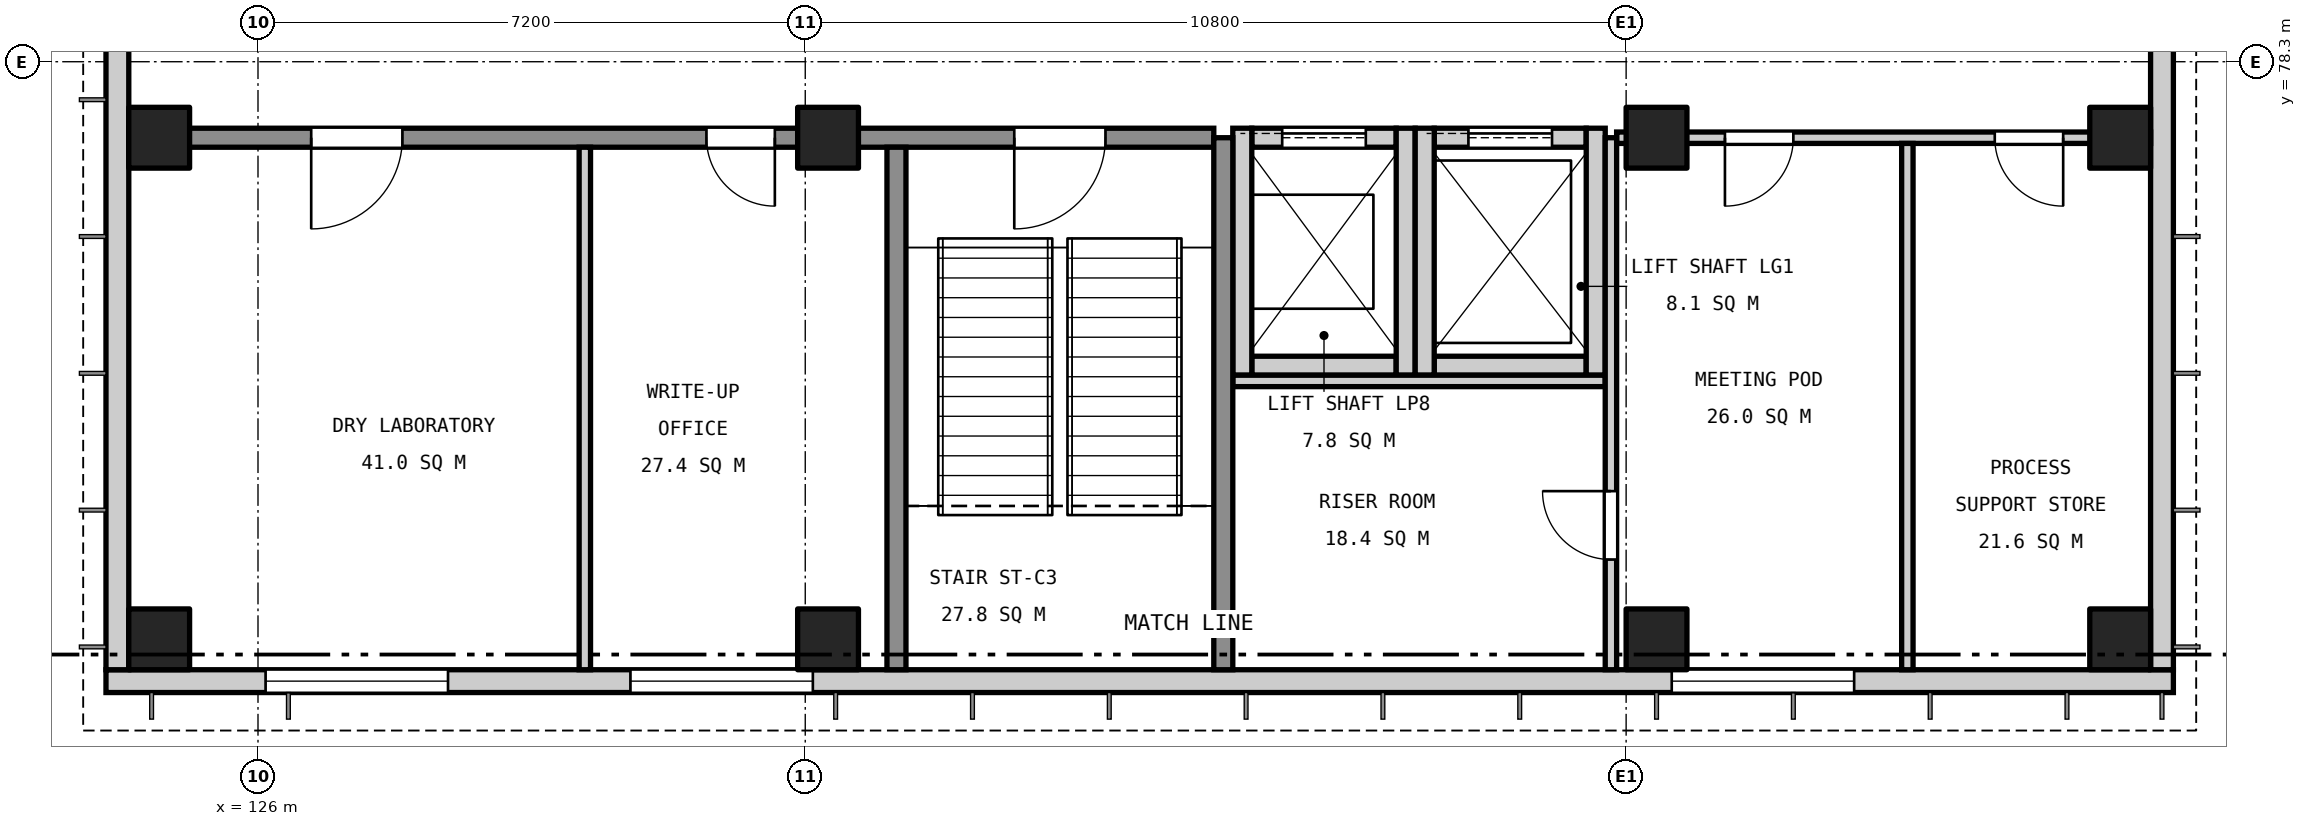
"""IFC4 building model, lengths in metres.
Left out: names, types, materials, properties, quantities, classifications, styles, units other than length and angle.
Written with IfcOpenShell. Run it as: python <this file> out.ifc"""

import sys

from ifc_helpers import new_model, si_unit, direction, frame, frame_2d, origin, origin_2d, place, context, subcontext, project, spatial, rectangle, extrude, element, fill, save


model = new_model("IFC4")
c1 = context("Model", 3, precision=1e-05, world=origin(), true_north=direction((0.0, 1.0)))
c2 = subcontext(c1, "Body", "Model", "MODEL_VIEW")
j1 = project(units=[si_unit("LENGTHUNIT", "METRE"), si_unit("PLANEANGLEUNIT", "RADIAN")], contexts=[c1])
p1 = place(None, origin())
s1 = spatial("IfcSite", under=j1, at=p1, CompositionType="ELEMENT")
p2 = place(p1, origin())
s2 = spatial("IfcBuilding", under=s1, at=p2, CompositionType="ELEMENT")
p3 = place(p2, frame((0.0, 0.0, 11.4)))
s3 = spatial("IfcBuildingStorey", under=s2, at=p3, CompositionType="ELEMENT", Elevation=11.4)
p4 = place(p3, frame((139.075, 74.3, 0.0), z_axis=(0.0, 0.0, 1.0), x_axis=(1.0, 0.0, 0.0)))
e1 = element("IfcWall", 1, at=p4, inside=s3, PredefinedType="SOLIDWALL", context=c2, shape_type="SweptSolid", body=[
    extrude(rectangle(XDim=1.9, YDim=0.25, at=frame_2d((0.95, 0.0))), origin(), (0.0, 0.0, 1.0), 4.95),
])
p5 = place(p3, frame((139.075, 77.3, 0.0), z_axis=(0.0, 0.0, 1.0), x_axis=(1.0, 0.0, 0.0)))
e2 = element("IfcWall", 2, at=p5, inside=s3, PredefinedType="SOLIDWALL", context=c2, shape_type="SweptSolid", body=[
    extrude(rectangle(XDim=1.9, YDim=0.25, at=frame_2d((0.95, 0.0))), origin(), (0.0, 0.0, 1.0), 4.95),
])
p6 = place(p5, frame((0.4, 0.0, 0.0)))
e3 = element("IfcOpeningElement", 3, at=p6, cuts=e2, PredefinedType="OPENING", context=c2, shape_type="SweptSolid", body=[
    extrude(rectangle(XDim=1.1, YDim=2.1, at=frame_2d((0.55, 1.05))), frame((0.0, 0.135, 0.0), z_axis=(0.0, -1.0, 0.0), x_axis=(1.0, 0.0, 0.0)), (0.0, 0.0, 1.0), 0.27),
])
for number, where, z_axis, x_axis in (
    (4, (138.95, 74.175, 0.0), (0.0, 0.0, 1.0), (0.0, 1.0, 0.0)),
    (5, (141.1, 74.175, 0.0), (0.0, 0.0, 1.0), (0.0, 1.0, 0.0)),
):
    element("IfcWall", number, at=place(p3, frame(where, z_axis=z_axis, x_axis=x_axis)), inside=s3, PredefinedType="SOLIDWALL", context=c2, shape_type="SweptSolid", body=[
        extrude(rectangle(XDim=3.25, YDim=0.25, at=frame_2d((1.625, 0.0))), origin(), (0.0, 0.0, 1.0), 4.95),
    ])
p7 = place(p3, frame((141.475, 74.3, 0.0), z_axis=(0.0, 0.0, 1.0), x_axis=(1.0, 0.0, 0.0)))
e6 = element("IfcWall", 6, at=p7, inside=s3, PredefinedType="SOLIDWALL", context=c2, shape_type="SweptSolid", body=[
    extrude(rectangle(XDim=2.0, YDim=0.25, at=frame_2d((1.0, 0.0))), origin(), (0.0, 0.0, 1.0), 4.95),
])
p8 = place(p3, frame((141.475, 77.3, 0.0), z_axis=(0.0, 0.0, 1.0), x_axis=(1.0, 0.0, 0.0)))
e7 = element("IfcWall", 7, at=p8, inside=s3, PredefinedType="SOLIDWALL", context=c2, shape_type="SweptSolid", body=[
    extrude(rectangle(XDim=2.0, YDim=0.25, at=frame_2d((1.0, 0.0))), origin(), (0.0, 0.0, 1.0), 4.95),
])
p9 = place(p8, frame((0.45, 0.0, 0.0)))
e8 = element("IfcOpeningElement", 8, at=p9, cuts=e7, PredefinedType="OPENING", context=c2, shape_type="SweptSolid", body=[
    extrude(rectangle(XDim=1.1, YDim=2.1, at=frame_2d((0.55, 1.05))), frame((0.0, 0.135, 0.0), z_axis=(0.0, -1.0, 0.0), x_axis=(1.0, 0.0, 0.0)), (0.0, 0.0, 1.0), 0.27),
])
for number, where, z_axis, x_axis in (
    (9, (141.35, 74.175, 0.0), (0.0, 0.0, 1.0), (0.0, 1.0, 0.0)),
    (10, (143.6, 74.175, 0.0), (0.0, 0.0, 1.0), (0.0, 1.0, 0.0)),
):
    element("IfcWall", number, at=place(p3, frame(where, z_axis=z_axis, x_axis=x_axis)), inside=s3, PredefinedType="SOLIDWALL", context=c2, shape_type="SweptSolid", body=[
        extrude(rectangle(XDim=3.25, YDim=0.25, at=frame_2d((1.625, 0.0))), origin(), (0.0, 0.0, 1.0), 4.95),
    ])
for number, where, z_axis, x_axis in (
    (11, (124.7, 70.7, 0.0), (0.0, 0.0, 1.0), (1.0, 0.0, 0.0)),
    (12, (124.7, 77.3, 0.0), (0.0, 0.0, 1.0), (1.0, 0.0, 0.0)),
    (13, (133.5, 70.7, 0.0), (0.0, 0.0, 1.0), (1.0, 0.0, 0.0)),
    (14, (133.5, 77.3, 0.0), (0.0, 0.0, 1.0), (1.0, 0.0, 0.0)),
    (15, (144.4, 70.7, 0.0), (0.0, 0.0, 1.0), (1.0, 0.0, 0.0)),
    (16, (144.4, 77.3, 0.0), (0.0, 0.0, 1.0), (1.0, 0.0, 0.0)),
    (17, (150.5, 70.7, 0.0), (0.0, 0.0, 1.0), (1.0, 0.0, 0.0)),
    (18, (150.5, 77.3, 0.0), (0.0, 0.0, 1.0), (1.0, 0.0, 0.0)),
):
    element("IfcColumn", number, at=place(p3, frame(where, z_axis=z_axis, x_axis=x_axis)), inside=s3, PredefinedType="COLUMN", context=c2, shape_type="SweptSolid", body=[
        extrude(rectangle(XDim=0.8, YDim=0.8, at=origin_2d()), origin(), (0.0, 0.0, 1.0), 5.4),
    ])
p10 = place(p3, frame((124.0, 70.15, 0.0), z_axis=(0.0, 0.0, 1.0), x_axis=(1.0, 0.0, 0.0)))
e19 = element("IfcWall", 19, at=p10, inside=s3, PredefinedType="SOLIDWALL", context=c2, shape_type="SweptSolid", body=[
    extrude(rectangle(XDim=27.2, YDim=0.3, at=frame_2d((13.6, 0.0))), origin(), (0.0, 0.0, 1.0), 4.95),
])
p11 = place(p10, frame((2.1, 0.0, 0.9)))
e20 = element("IfcOpeningElement", 20, at=p11, cuts=e19, PredefinedType="OPENING", context=c2, shape_type="SweptSolid", body=[
    extrude(rectangle(XDim=2.4, YDim=1.8, at=frame_2d((1.2, 0.9))), frame((0.0, 0.16, 0.0), z_axis=(0.0, -1.0, 0.0), x_axis=(1.0, 0.0, 0.0)), (0.0, 0.0, 1.0), 0.32),
])
p12 = place(p10, frame((6.9, 0.0, 0.9)))
e21 = element("IfcOpeningElement", 21, at=p12, cuts=e19, PredefinedType="OPENING", context=c2, shape_type="SweptSolid", body=[
    extrude(rectangle(XDim=2.4, YDim=1.8, at=frame_2d((1.2, 0.9))), frame((0.0, 0.16, 0.0), z_axis=(0.0, -1.0, 0.0), x_axis=(1.0, 0.0, 0.0)), (0.0, 0.0, 1.0), 0.32),
])
p13 = place(p10, frame((20.6, 0.0, 0.9)))
e22 = element("IfcOpeningElement", 22, at=p13, cuts=e19, PredefinedType="OPENING", context=c2, shape_type="SweptSolid", body=[
    extrude(rectangle(XDim=2.4, YDim=1.8, at=frame_2d((1.2, 0.9))), frame((0.0, 0.16, 0.0), z_axis=(0.0, -1.0, 0.0), x_axis=(1.0, 0.0, 0.0)), (0.0, 0.0, 1.0), 0.32),
])
for number, where, z_axis, x_axis in (
    (23, (124.15, 70.3, 0.0), (0.0, 0.0, 1.0), (0.0, 1.0, 0.0)),
    (24, (151.05, 70.3, 0.0), (0.0, 0.0, 1.0), (0.0, 1.0, 0.0)),
):
    element("IfcWall", number, at=place(p3, frame(where, z_axis=z_axis, x_axis=x_axis)), inside=s3, PredefinedType="SOLIDWALL", context=c2, shape_type="SweptSolid", body=[
        extrude(rectangle(XDim=36.5, YDim=0.3, at=frame_2d((18.25, 0.0))), origin(), (0.0, 0.0, 1.0), 4.95),
    ])
p14 = place(p3, frame((138.825, 74.1, 0.0), z_axis=(0.0, 0.0, 1.0), x_axis=(1.0, 0.0, 0.0)))
e25 = element("IfcWall", 25, at=p14, inside=s3, PredefinedType="SOLIDWALL", context=c2, shape_type="SweptSolid", body=[
    extrude(rectangle(XDim=4.9, YDim=0.15, at=frame_2d((2.45, 0.0))), origin(), (0.0, 0.0, 1.0), 4.95),
])
p15 = place(p3, frame((124.3, 77.3, 0.0), z_axis=(0.0, 0.0, 1.0), x_axis=(1.0, 0.0, 0.0)))
e26 = element("IfcWall", 26, at=p15, inside=s3, PredefinedType="SOLIDWALL", context=c2, shape_type="SweptSolid", body=[
    extrude(rectangle(XDim=14.275, YDim=0.25, at=frame_2d((7.137, 0.0))), origin(), (0.0, 0.0, 1.0), 4.95),
])
p16 = place(p15, frame((2.4, 0.0, 0.0)))
e27 = element("IfcOpeningElement", 27, at=p16, cuts=e26, PredefinedType="OPENING", context=c2, shape_type="SweptSolid", body=[
    extrude(rectangle(XDim=1.2, YDim=2.1, at=frame_2d((0.6, 1.05))), frame((0.0, 0.135, 0.0), z_axis=(0.0, -1.0, 0.0), x_axis=(1.0, 0.0, 0.0)), (0.0, 0.0, 1.0), 0.27),
])
p17 = place(p15, frame((7.6, 0.0, 0.0)))
e28 = element("IfcOpeningElement", 28, at=p17, cuts=e26, PredefinedType="OPENING", context=c2, shape_type="SweptSolid", body=[
    extrude(rectangle(XDim=0.9, YDim=2.1, at=frame_2d((0.45, 1.05))), frame((0.0, 0.135, 0.0), z_axis=(0.0, -1.0, 0.0), x_axis=(1.0, 0.0, 0.0)), (0.0, 0.0, 1.0), 0.27),
])
p18 = place(p15, frame((11.65, 0.0, 0.0)))
e29 = element("IfcOpeningElement", 29, at=p18, cuts=e26, PredefinedType="OPENING", context=c2, shape_type="SweptSolid", body=[
    extrude(rectangle(XDim=1.2, YDim=2.1, at=frame_2d((0.6, 1.05))), frame((0.0, 0.135, 0.0), z_axis=(0.0, -1.0, 0.0), x_axis=(1.0, 0.0, 0.0)), (0.0, 0.0, 1.0), 0.27),
])
p19 = place(p3, frame((143.875, 77.3, 0.0), z_axis=(0.0, 0.0, 1.0), x_axis=(1.0, 0.0, 0.0)))
e30 = element("IfcWall", 30, at=p19, inside=s3, PredefinedType="SOLIDWALL", context=c2, shape_type="SweptSolid", body=[
    extrude(rectangle(XDim=7.025, YDim=0.15, at=frame_2d((3.512, 0.0))), origin(), (0.0, 0.0, 1.0), 4.95),
])
p20 = place(p19, frame((1.425, 0.0, 0.0)))
e31 = element("IfcOpeningElement", 31, at=p20, cuts=e30, PredefinedType="OPENING", context=c2, shape_type="SweptSolid", body=[
    extrude(rectangle(XDim=0.9, YDim=2.1, at=frame_2d((0.45, 1.05))), frame((0.0, 0.085, 0.0), z_axis=(0.0, -1.0, 0.0), x_axis=(1.0, 0.0, 0.0)), (0.0, 0.0, 1.0), 0.17),
])
p21 = place(p19, frame((4.975, 0.0, 0.0)))
e32 = element("IfcOpeningElement", 32, at=p21, cuts=e30, PredefinedType="OPENING", context=c2, shape_type="SweptSolid", body=[
    extrude(rectangle(XDim=0.9, YDim=2.1, at=frame_2d((0.45, 1.05))), frame((0.0, 0.085, 0.0), z_axis=(0.0, -1.0, 0.0), x_axis=(1.0, 0.0, 0.0)), (0.0, 0.0, 1.0), 0.17),
])
p22 = place(p3, frame((130.3, 70.3, 0.0), z_axis=(0.0, 0.0, 1.0), x_axis=(0.0, 1.0, 0.0)))
e33 = element("IfcWall", 33, at=p22, inside=s3, PredefinedType="SOLIDWALL", context=c2, shape_type="SweptSolid", body=[
    extrude(rectangle(XDim=6.875, YDim=0.15, at=frame_2d((3.438, 0.0))), origin(), (0.0, 0.0, 1.0), 4.95),
])
p23 = place(p3, frame((134.4, 70.3, 0.0), z_axis=(0.0, 0.0, 1.0), x_axis=(0.0, 1.0, 0.0)))
e34 = element("IfcWall", 34, at=p23, inside=s3, PredefinedType="SOLIDWALL", context=c2, shape_type="SweptSolid", body=[
    extrude(rectangle(XDim=6.875, YDim=0.25, at=frame_2d((3.438, 0.0))), origin(), (0.0, 0.0, 1.0), 4.95),
])
p24 = place(p3, frame((138.7, 70.3, 0.0), z_axis=(0.0, 0.0, 1.0), x_axis=(0.0, 1.0, 0.0)))
e35 = element("IfcWall", 35, at=p24, inside=s3, PredefinedType="SOLIDWALL", context=c2, shape_type="SweptSolid", body=[
    extrude(rectangle(XDim=7.0, YDim=0.25, at=frame_2d((3.5, 0.0))), origin(), (0.0, 0.0, 1.0), 4.95),
])
p25 = place(p3, frame((143.8, 70.3, 0.0), z_axis=(0.0, 0.0, 1.0), x_axis=(0.0, 1.0, 0.0)))
e36 = element("IfcWall", 36, at=p25, inside=s3, PredefinedType="SOLIDWALL", context=c2, shape_type="SweptSolid", body=[
    extrude(rectangle(XDim=7.0, YDim=0.15, at=frame_2d((3.5, 0.0))), origin(), (0.0, 0.0, 1.0), 4.95),
])
p26 = place(p25, frame((1.45, 0.0, 0.0)))
e37 = element("IfcOpeningElement", 37, at=p26, cuts=e36, PredefinedType="OPENING", context=c2, shape_type="SweptSolid", body=[
    extrude(rectangle(XDim=0.9, YDim=2.1, at=frame_2d((0.45, 1.05))), frame((0.0, 0.085, 0.0), z_axis=(0.0, -1.0, 0.0), x_axis=(1.0, 0.0, 0.0)), (0.0, 0.0, 1.0), 0.17),
])
p27 = place(p3, frame((147.7, 70.3, 0.0), z_axis=(0.0, 0.0, 1.0), x_axis=(0.0, 1.0, 0.0)))
e38 = element("IfcWall", 38, at=p27, inside=s3, PredefinedType="SOLIDWALL", context=c2, shape_type="SweptSolid", body=[
    extrude(rectangle(XDim=6.925, YDim=0.15, at=frame_2d((3.462, 0.0))), origin(), (0.0, 0.0, 1.0), 4.95),
])
p28 = place(p16, frame((1.2, 0.0, 0.0), z_axis=(0.0, 0.0, 1.0), x_axis=(-1.0, 0.0, 0.0)))
e39 = element("IfcDoor", 39, at=p28, inside=s3, OperationType="SINGLE_SWING_RIGHT", PredefinedType="DOOR", context=c2, shape_type="SweptSolid", body=[
    extrude(rectangle(XDim=1.2, YDim=2.1, at=frame_2d((0.6, 1.05))), frame((0.0, 0.025, 0.0), z_axis=(0.0, -1.0, 0.0), x_axis=(1.0, 0.0, 0.0)), (0.0, 0.0, 1.0), 0.05),
])
fill(e27, e39)
p29 = place(p17, frame((0.9, 0.0, 0.0), z_axis=(0.0, 0.0, 1.0), x_axis=(-1.0, 0.0, 0.0)))
e40 = element("IfcDoor", 40, at=p29, inside=s3, OperationType="SINGLE_SWING_LEFT", PredefinedType="DOOR", context=c2, shape_type="SweptSolid", body=[
    extrude(rectangle(XDim=0.9, YDim=2.1, at=frame_2d((0.45, 1.05))), frame((0.0, 0.025, 0.0), z_axis=(0.0, -1.0, 0.0), x_axis=(1.0, 0.0, 0.0)), (0.0, 0.0, 1.0), 0.05),
])
fill(e28, e40)
p30 = place(p20, frame((0.9, 0.0, 0.0), z_axis=(0.0, 0.0, 1.0), x_axis=(-1.0, 0.0, 0.0)))
e41 = element("IfcDoor", 41, at=p30, inside=s3, OperationType="SINGLE_SWING_RIGHT", PredefinedType="DOOR", context=c2, shape_type="SweptSolid", body=[
    extrude(rectangle(XDim=0.9, YDim=2.1, at=frame_2d((0.45, 1.05))), frame((0.0, 0.025, 0.0), z_axis=(0.0, -1.0, 0.0), x_axis=(1.0, 0.0, 0.0)), (0.0, 0.0, 1.0), 0.05),
])
fill(e31, e41)
p31 = place(p21, frame((0.9, 0.0, 0.0), z_axis=(0.0, 0.0, 1.0), x_axis=(-1.0, 0.0, 0.0)))
e42 = element("IfcDoor", 42, at=p31, inside=s3, OperationType="SINGLE_SWING_LEFT", PredefinedType="DOOR", context=c2, shape_type="SweptSolid", body=[
    extrude(rectangle(XDim=0.9, YDim=2.1, at=frame_2d((0.45, 1.05))), frame((0.0, 0.025, 0.0), z_axis=(0.0, -1.0, 0.0), x_axis=(1.0, 0.0, 0.0)), (0.0, 0.0, 1.0), 0.05),
])
fill(e32, e42)
p32 = place(p26, origin())
e43 = element("IfcDoor", 43, at=p32, inside=s3, OperationType="SINGLE_SWING_RIGHT", PredefinedType="DOOR", context=c2, shape_type="SweptSolid", body=[
    extrude(rectangle(XDim=0.9, YDim=2.1, at=frame_2d((0.45, 1.05))), frame((0.0, 0.025, 0.0), z_axis=(0.0, -1.0, 0.0), x_axis=(1.0, 0.0, 0.0)), (0.0, 0.0, 1.0), 0.05),
])
fill(e37, e43)
p33 = place(p18, frame((1.2, 0.0, 0.0), z_axis=(0.0, 0.0, 1.0), x_axis=(-1.0, 0.0, 0.0)))
e44 = element("IfcDoor", 44, at=p33, inside=s3, OperationType="SINGLE_SWING_RIGHT", PredefinedType="DOOR", context=c2, shape_type="SweptSolid", body=[
    extrude(rectangle(XDim=1.2, YDim=2.1, at=frame_2d((0.6, 1.05))), frame((0.0, 0.025, 0.0), z_axis=(0.0, -1.0, 0.0), x_axis=(1.0, 0.0, 0.0)), (0.0, 0.0, 1.0), 0.05),
])
fill(e29, e44)
p34 = place(p6, origin())
e45 = element("IfcDoor", 45, at=p34, inside=s3, OperationType="SLIDING_TO_LEFT", PredefinedType="DOOR", context=c2, shape_type="SweptSolid", body=[
    extrude(rectangle(XDim=1.1, YDim=2.1, at=frame_2d((0.55, 1.05))), frame((0.0, 0.025, 0.0), z_axis=(0.0, -1.0, 0.0), x_axis=(1.0, 0.0, 0.0)), (0.0, 0.0, 1.0), 0.05),
])
fill(e3, e45)
p35 = place(p9, origin())
e46 = element("IfcDoor", 46, at=p35, inside=s3, OperationType="SLIDING_TO_LEFT", PredefinedType="DOOR", context=c2, shape_type="SweptSolid", body=[
    extrude(rectangle(XDim=1.1, YDim=2.1, at=frame_2d((0.55, 1.05))), frame((0.0, 0.025, 0.0), z_axis=(0.0, -1.0, 0.0), x_axis=(1.0, 0.0, 0.0)), (0.0, 0.0, 1.0), 0.05),
])
fill(e8, e46)
p36 = place(p11, origin())
e47 = element("IfcWindow", 47, at=p36, inside=s3, PartitioningType="SINGLE_PANEL", PredefinedType="WINDOW", context=c2, shape_type="SweptSolid", body=[
    extrude(rectangle(XDim=2.4, YDim=1.8, at=frame_2d((1.2, 0.9))), frame((0.0, 0.03, 0.0), z_axis=(0.0, -1.0, 0.0), x_axis=(1.0, 0.0, 0.0)), (0.0, 0.0, 1.0), 0.06),
])
fill(e20, e47)
p37 = place(p12, origin())
e48 = element("IfcWindow", 48, at=p37, inside=s3, PartitioningType="SINGLE_PANEL", PredefinedType="WINDOW", context=c2, shape_type="SweptSolid", body=[
    extrude(rectangle(XDim=2.4, YDim=1.8, at=frame_2d((1.2, 0.9))), frame((0.0, 0.03, 0.0), z_axis=(0.0, -1.0, 0.0), x_axis=(1.0, 0.0, 0.0)), (0.0, 0.0, 1.0), 0.06),
])
fill(e21, e48)
p38 = place(p13, origin())
e49 = element("IfcWindow", 49, at=p38, inside=s3, PartitioningType="SINGLE_PANEL", PredefinedType="WINDOW", context=c2, shape_type="SweptSolid", body=[
    extrude(rectangle(XDim=2.4, YDim=1.8, at=frame_2d((1.2, 0.9))), frame((0.0, 0.03, 0.0), z_axis=(0.0, -1.0, 0.0), x_axis=(1.0, 0.0, 0.0)), (0.0, 0.0, 1.0), 0.06),
])
fill(e22, e49)
save(model, sys.argv[1])
